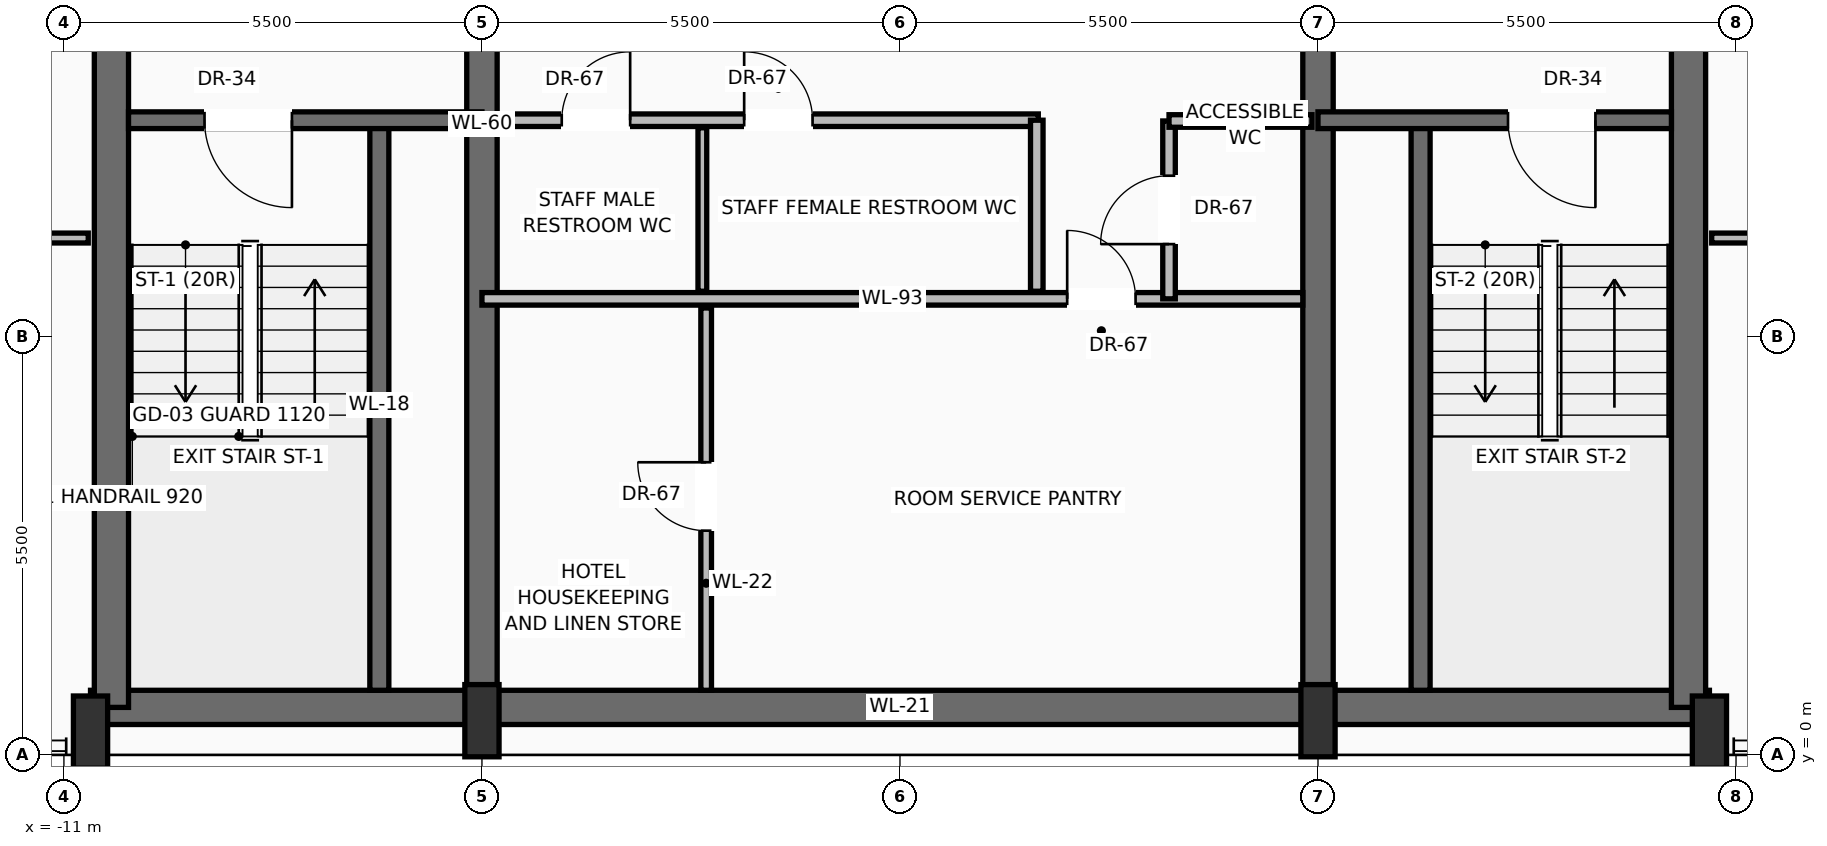
"""IFC4 building model, lengths in metres.
Left out: names, types, materials, properties, quantities, classifications, styles, units other than length and angle.
Written with IfcOpenShell. Run it as: python <this file> out.ifc"""

import sys

from ifc_helpers import new_model, si_unit, direction, frame, frame_2d, origin, origin_2d, place, context, subcontext, project, spatial, rectangle, extrude, source, transform, mapped, element, fill, save


model = new_model("IFC4")
c1 = context("Model", 3, precision=1e-05, world=origin(), true_north=direction((0.0, 1.0)))
c2 = subcontext(c1, "Body", "Model", "MODEL_VIEW")
j1 = project(units=[si_unit("LENGTHUNIT", "METRE"), si_unit("PLANEANGLEUNIT", "RADIAN")], contexts=[c1])
p1 = place(None, origin())
s1 = spatial("IfcSite", under=j1, at=p1, CompositionType="ELEMENT")
p2 = place(p1, origin())
s2 = spatial("IfcBuilding", under=s1, at=p2, CompositionType="ELEMENT")
p3 = place(p2, frame((0.0, 0.0, 290.25)))
s3 = spatial("IfcBuildingStorey", under=s2, at=p3, CompositionType="ELEMENT", Elevation=290.25)
p4 = place(p3, frame((-10.65, 0.625, 0.0), z_axis=(0.0, 0.0, 1.0), x_axis=(1.0, 0.0, 0.0)))
e1 = element("IfcWall", 1, at=p4, inside=s3, PredefinedType="SHEAR", context=c2, shape_type="SweptSolid", body=[
    extrude(rectangle(XDim=21.3, YDim=0.45, at=frame_2d((10.65, 0.0))), origin(), (0.0, 0.0, 1.0), 3.24),
])
for number, where, z_axis, x_axis in (
    (2, (-10.375, 0.625, 0.0), (0.0, 0.0, 1.0), (0.0, 1.0, 0.0)),
    (3, (10.375, 0.625, 0.0), (0.0, 0.0, 1.0), (0.0, 1.0, 0.0)),
):
    element("IfcWall", number, at=place(p3, frame(where, z_axis=z_axis, x_axis=x_axis)), inside=s3, PredefinedType="SHEAR", context=c2, shape_type="SweptSolid", body=[
        extrude(rectangle(XDim=15.35, YDim=0.45, at=frame_2d((7.675, 0.0))), origin(), (0.0, 0.0, 1.0), 3.24),
    ])
p5 = place(p3, frame((-5.5, 0.625, 0.0), z_axis=(0.0, 0.0, 1.0), x_axis=(0.0, 1.0, 0.0)))
e4 = element("IfcWall", 4, at=p5, inside=s3, PredefinedType="SHEAR", context=c2, shape_type="SweptSolid", body=[
    extrude(rectangle(XDim=15.35, YDim=0.4, at=frame_2d((7.675, 0.0))), origin(), (0.0, 0.0, 1.0), 3.24),
])
p6 = place(p5, frame((8.875, 0.0, 0.0)))
e5 = element("IfcOpeningElement", 5, at=p6, cuts=e4, PredefinedType="OPENING", context=c2, shape_type="SweptSolid", body=[
    extrude(rectangle(XDim=1.1, YDim=2.2, at=frame_2d((0.55, 1.1))), frame((0.0, 0.21, 0.0), z_axis=(0.0, -1.0, 0.0), x_axis=(1.0, 0.0, 0.0)), (0.0, 0.0, 1.0), 0.42),
])
p7 = place(p3, frame((5.5, 0.625, 0.0), z_axis=(0.0, 0.0, 1.0), x_axis=(0.0, 1.0, 0.0)))
e6 = element("IfcWall", 6, at=p7, inside=s3, PredefinedType="SHEAR", context=c2, shape_type="SweptSolid", body=[
    extrude(rectangle(XDim=15.35, YDim=0.4, at=frame_2d((7.675, 0.0))), origin(), (0.0, 0.0, 1.0), 3.24),
])
p8 = place(p7, frame((8.875, 0.0, 0.0)))
e7 = element("IfcOpeningElement", 7, at=p8, cuts=e6, PredefinedType="OPENING", context=c2, shape_type="SweptSolid", body=[
    extrude(rectangle(XDim=1.1, YDim=2.2, at=frame_2d((0.55, 1.1))), frame((0.0, 0.21, 0.0), z_axis=(0.0, -1.0, 0.0), x_axis=(1.0, 0.0, 0.0)), (0.0, 0.0, 1.0), 0.42),
])
m1 = source(origin(), c2, "Body", "SweptSolid", [
    extrude(rectangle(XDim=0.45, YDim=0.95, at=origin_2d()), origin(), (0.0, 0.0, 1.0), 3.45),
])
for number, where, z_axis, x_axis in (
    (8, (-10.65, 0.3, 0.0), (0.0, 0.0, 1.0), (1.0, 0.0, 0.0)),
    (9, (-5.5, 0.45, 0.0), (0.0, 0.0, 1.0), (1.0, 0.0, 0.0)),
    (10, (5.5, 0.45, 0.0), (0.0, 0.0, 1.0), (1.0, 0.0, 0.0)),
    (11, (10.65, 0.3, 0.0), (0.0, 0.0, 1.0), (1.0, 0.0, 0.0)),
):
    element("IfcColumn", number, at=place(p3, frame(where, z_axis=z_axis, x_axis=x_axis)), inside=s3, PredefinedType="PILASTER", context=c2, shape_type="MappedRepresentation", body=[
        mapped(m1, transform((0.0, 0.0, 0.0), scale=1.0)),
    ])
p9 = place(p3, frame((-6.85, 0.85, 0.0), z_axis=(0.0, 0.0, 1.0), x_axis=(0.0, 1.0, 0.0)))
e12 = element("IfcWall", 12, at=p9, inside=s3, PredefinedType="SOLIDWALL", context=c2, shape_type="SweptSolid", body=[
    extrude(rectangle(XDim=7.5, YDim=0.25, at=frame_2d((3.75, 0.0))), origin(), (0.0, 0.0, 1.0), 3.24),
])
p10 = place(p3, frame((-5.5, 8.35, 0.0), z_axis=(0.0, 0.0, 1.0), x_axis=(-1.0, 0.0, 0.0)))
e13 = element("IfcWall", 13, at=p10, inside=s3, PredefinedType="SOLIDWALL", context=c2, shape_type="SweptSolid", body=[
    extrude(rectangle(XDim=4.65, YDim=0.22, at=frame_2d((2.325, 0.0))), origin(), (0.0, 0.0, 1.0), 3.24),
])
p11 = place(p10, frame((2.5, 0.0, 0.0)))
e14 = element("IfcOpeningElement", 14, at=p11, cuts=e13, PredefinedType="OPENING", context=c2, shape_type="SweptSolid", body=[
    extrude(rectangle(XDim=1.15, YDim=2.2, at=frame_2d((0.575, 1.1))), frame((0.0, 0.12, 0.0), z_axis=(0.0, -1.0, 0.0), x_axis=(1.0, 0.0, 0.0)), (0.0, 0.0, 1.0), 0.24),
])
p12 = place(p3, frame((6.85, 0.85, 0.0), z_axis=(0.0, 0.0, 1.0), x_axis=(0.0, 1.0, 0.0)))
e15 = element("IfcWall", 15, at=p12, inside=s3, PredefinedType="SOLIDWALL", context=c2, shape_type="SweptSolid", body=[
    extrude(rectangle(XDim=7.5, YDim=0.25, at=frame_2d((3.75, 0.0))), origin(), (0.0, 0.0, 1.0), 3.24),
])
p13 = place(p3, frame((10.15, 8.35, 0.0), z_axis=(0.0, 0.0, 1.0), x_axis=(-1.0, 0.0, 0.0)))
e16 = element("IfcWall", 16, at=p13, inside=s3, PredefinedType="SOLIDWALL", context=c2, shape_type="SweptSolid", body=[
    extrude(rectangle(XDim=4.65, YDim=0.22, at=frame_2d((2.325, 0.0))), origin(), (0.0, 0.0, 1.0), 3.24),
])
p14 = place(p13, frame((1.0, 0.0, 0.0)))
e17 = element("IfcOpeningElement", 17, at=p14, cuts=e16, PredefinedType="OPENING", context=c2, shape_type="SweptSolid", body=[
    extrude(rectangle(XDim=1.15, YDim=2.2, at=frame_2d((0.575, 1.1))), frame((0.0, 0.12, 0.0), z_axis=(0.0, -1.0, 0.0), x_axis=(1.0, 0.0, 0.0)), (0.0, 0.0, 1.0), 0.24),
])
p15 = place(p3, frame((-5.5, 6.0, 0.0), z_axis=(0.0, 0.0, 1.0), x_axis=(1.0, 0.0, 0.0)))
e18 = element("IfcWall", 18, at=p15, inside=s3, PredefinedType="PARTITIONING", context=c2, shape_type="SweptSolid", body=[
    extrude(rectangle(XDim=10.8, YDim=0.165, at=frame_2d((5.4, 0.0))), origin(), (0.0, 0.0, 1.0), 3.232),
])
p16 = place(p15, frame((7.7, 0.0, 0.0)))
e19 = element("IfcOpeningElement", 19, at=p16, cuts=e18, PredefinedType="OPENING", context=c2, shape_type="SweptSolid", body=[
    extrude(rectangle(XDim=0.9, YDim=2.1, at=frame_2d((0.45, 1.05))), frame((0.0, 0.093, 0.0), z_axis=(0.0, -1.0, 0.0), x_axis=(1.0, 0.0, 0.0)), (0.0, 0.0, 1.0), 0.185),
])
p17 = place(p3, frame((-2.55, 0.85, 0.0), z_axis=(0.0, 0.0, 1.0), x_axis=(0.0, 1.0, 0.0)))
e20 = element("IfcWall", 20, at=p17, inside=s3, PredefinedType="PARTITIONING", context=c2, shape_type="SweptSolid", body=[
    extrude(rectangle(XDim=5.03, YDim=0.14, at=frame_2d((2.515, 0.0))), origin(), (0.0, 0.0, 1.0), 3.232),
])
p18 = place(p17, frame((2.1, 0.0, 0.0)))
e21 = element("IfcOpeningElement", 21, at=p18, cuts=e20, PredefinedType="OPENING", context=c2, shape_type="SweptSolid", body=[
    extrude(rectangle(XDim=0.9, YDim=2.1, at=frame_2d((0.45, 1.05))), frame((0.0, 0.08, 0.0), z_axis=(0.0, -1.0, 0.0), x_axis=(1.0, 0.0, 0.0)), (0.0, 0.0, 1.0), 0.16),
])
p19 = place(p3, frame((3.54, 6.0, 0.0), z_axis=(0.0, 0.0, 1.0), x_axis=(0.0, 1.0, 0.0)))
e22 = element("IfcWall", 22, at=p19, inside=s3, PredefinedType="PARTITIONING", context=c2, shape_type="SweptSolid", body=[
    extrude(rectangle(XDim=2.34, YDim=0.165, at=frame_2d((1.17, 0.0))), origin(), (0.0, 0.0, 1.0), 3.232),
])
p20 = place(p19, frame((0.72, 0.0, 0.0)))
e23 = element("IfcOpeningElement", 23, at=p20, cuts=e22, PredefinedType="OPENING", context=c2, shape_type="SweptSolid", body=[
    extrude(rectangle(XDim=0.9, YDim=2.1, at=frame_2d((0.45, 1.05))), frame((0.0, 0.093, 0.0), z_axis=(0.0, -1.0, 0.0), x_axis=(1.0, 0.0, 0.0)), (0.0, 0.0, 1.0), 0.185),
])
p21 = place(p3, frame((3.54, 8.34, 0.0), z_axis=(0.0, 0.0, 1.0), x_axis=(1.0, 0.0, 0.0)))
e24 = element("IfcWall", 24, at=p21, inside=s3, PredefinedType="PARTITIONING", context=c2, shape_type="SweptSolid", body=[
    extrude(rectangle(XDim=1.88, YDim=0.165, at=frame_2d((0.94, 0.0))), origin(), (0.0, 0.0, 1.0), 3.232),
])
p22 = place(p3, frame((-5.3, 8.35, 0.0), z_axis=(0.0, 0.0, 1.0), x_axis=(1.0, 0.0, 0.0)))
e25 = element("IfcWall", 25, at=p22, inside=s3, PredefinedType="PARTITIONING", context=c2, shape_type="SweptSolid", body=[
    extrude(rectangle(XDim=7.12, YDim=0.165, at=frame_2d((3.56, 0.0))), origin(), (0.0, 0.0, 1.0), 3.232),
])
p23 = place(p22, frame((0.85, 0.0, 0.0)))
e26 = element("IfcOpeningElement", 26, at=p23, cuts=e25, PredefinedType="OPENING", context=c2, shape_type="SweptSolid", body=[
    extrude(rectangle(XDim=0.9, YDim=2.1, at=frame_2d((0.45, 1.05))), frame((0.0, 0.093, 0.0), z_axis=(0.0, -1.0, 0.0), x_axis=(1.0, 0.0, 0.0)), (0.0, 0.0, 1.0), 0.185),
])
p24 = place(p22, frame((3.25, 0.0, 0.0)))
e27 = element("IfcOpeningElement", 27, at=p24, cuts=e25, PredefinedType="OPENING", context=c2, shape_type="SweptSolid", body=[
    extrude(rectangle(XDim=0.9, YDim=2.1, at=frame_2d((0.45, 1.05))), frame((0.0, 0.093, 0.0), z_axis=(0.0, -1.0, 0.0), x_axis=(1.0, 0.0, 0.0)), (0.0, 0.0, 1.0), 0.185),
])
p25 = place(p3, frame((1.8, 6.1, 0.0), z_axis=(0.0, 0.0, 1.0), x_axis=(0.0, 1.0, 0.0)))
e28 = element("IfcWall", 28, at=p25, inside=s3, PredefinedType="PARTITIONING", context=c2, shape_type="SweptSolid", body=[
    extrude(rectangle(XDim=2.25, YDim=0.165, at=frame_2d((1.125, 0.0))), origin(), (0.0, 0.0, 1.0), 3.232),
])
p26 = place(p3, frame((-2.6, 6.1, 0.0), z_axis=(0.0, 0.0, 1.0), x_axis=(0.0, 1.0, 0.0)))
e29 = element("IfcWall", 29, at=p26, inside=s3, PredefinedType="PARTITIONING", context=c2, shape_type="SweptSolid", body=[
    extrude(rectangle(XDim=2.15, YDim=0.115, at=frame_2d((1.075, 0.0))), origin(), (0.0, 0.0, 1.0), 3.232),
])
p27 = place(p3, frame((-22.288, 6.8, 0.0), z_axis=(0.0, 0.0, 1.0), x_axis=(1.0, 0.0, 0.0)))
e30 = element("IfcWall", 30, at=p27, inside=s3, PredefinedType="PARTITIONING", context=c2, shape_type="SweptSolid", body=[
    extrude(rectangle(XDim=11.608, YDim=0.13, at=frame_2d((5.804, 0.0))), origin(), (0.0, 0.0, 1.0), 3.232),
])
p28 = place(p27, frame((4.783, 0.0, 0.0)))
e31 = element("IfcOpeningElement", 31, at=p28, cuts=e30, PredefinedType="OPENING", context=c2, shape_type="SweptSolid", body=[
    extrude(rectangle(XDim=0.95, YDim=2.2, at=frame_2d((0.475, 1.1))), frame((0.0, 0.075, 0.0), z_axis=(0.0, -1.0, 0.0), x_axis=(1.0, 0.0, 0.0)), (0.0, 0.0, 1.0), 0.15),
])
p29 = place(p3, frame((10.68, 6.8, 0.0), z_axis=(0.0, 0.0, 1.0), x_axis=(1.0, 0.0, 0.0)))
e32 = element("IfcWall", 32, at=p29, inside=s3, PredefinedType="PARTITIONING", context=c2, shape_type="SweptSolid", body=[
    extrude(rectangle(XDim=11.562, YDim=0.13, at=frame_2d((5.781, 0.0))), origin(), (0.0, 0.0, 1.0), 3.232),
])
p30 = place(p29, frame((4.762, 0.0, 0.0)))
e33 = element("IfcOpeningElement", 33, at=p30, cuts=e32, PredefinedType="OPENING", context=c2, shape_type="SweptSolid", body=[
    extrude(rectangle(XDim=0.95, YDim=2.2, at=frame_2d((0.475, 1.1))), frame((0.0, 0.075, 0.0), z_axis=(0.0, -1.0, 0.0), x_axis=(1.0, 0.0, 0.0)), (0.0, 0.0, 1.0), 0.15),
])
m2 = source(origin(), c2, "Body", "SweptSolid", [
    extrude(rectangle(XDim=1.15, YDim=2.2, at=frame_2d((0.575, 1.1))), frame((0.0, 0.025, 0.0), z_axis=(0.0, -1.0, 0.0), x_axis=(1.0, 0.0, 0.0)), (0.0, 0.0, 1.0), 0.05),
])
p31 = place(p11, origin())
e34 = element("IfcDoor", 34, at=p31, inside=s3, OperationType="SINGLE_SWING_LEFT", PredefinedType="DOOR", context=c2, shape_type="MappedRepresentation", body=[
    mapped(m2, transform((0.0, 0.0, 0.0), scale=1.0)),
])
fill(e14, e34)
p32 = place(p14, origin())
e35 = element("IfcDoor", 35, at=p32, inside=s3, OperationType="SINGLE_SWING_LEFT", PredefinedType="DOOR", context=c2, shape_type="MappedRepresentation", body=[
    mapped(m2, transform((0.0, 0.0, 0.0), scale=1.0)),
])
fill(e17, e35)
m3 = source(origin(), c2, "Body", "SweptSolid", [
    extrude(rectangle(XDim=0.9, YDim=2.1, at=frame_2d((0.45, 1.05))), frame((0.0, 0.025, 0.0), z_axis=(0.0, -1.0, 0.0), x_axis=(1.0, 0.0, 0.0)), (0.0, 0.0, 1.0), 0.05),
])
p33 = place(p16, origin())
e36 = element("IfcDoor", 36, at=p33, inside=s3, OperationType="SINGLE_SWING_LEFT", PredefinedType="DOOR", context=c2, shape_type="MappedRepresentation", body=[
    mapped(m3, transform((0.0, 0.0, 0.0), scale=1.0)),
])
fill(e19, e36)
p34 = place(p18, origin())
e37 = element("IfcDoor", 37, at=p34, inside=s3, OperationType="SINGLE_SWING_RIGHT", PredefinedType="DOOR", context=c2, shape_type="MappedRepresentation", body=[
    mapped(m3, transform((0.0, 0.0, 0.0), scale=1.0)),
])
fill(e21, e37)
p35 = place(p20, origin())
e38 = element("IfcDoor", 38, at=p35, inside=s3, OperationType="SINGLE_SWING_LEFT", PredefinedType="DOOR", context=c2, shape_type="MappedRepresentation", body=[
    mapped(m3, transform((0.0, 0.0, 0.0), scale=1.0)),
])
fill(e23, e38)
p36 = place(p23, origin())
e39 = element("IfcDoor", 39, at=p36, inside=s3, OperationType="SINGLE_SWING_RIGHT", PredefinedType="DOOR", context=c2, shape_type="MappedRepresentation", body=[
    mapped(m3, transform((0.0, 0.0, 0.0), scale=1.0)),
])
fill(e26, e39)
p37 = place(p24, origin())
e40 = element("IfcDoor", 40, at=p37, inside=s3, OperationType="SINGLE_SWING_LEFT", PredefinedType="DOOR", context=c2, shape_type="MappedRepresentation", body=[
    mapped(m3, transform((0.0, 0.0, 0.0), scale=1.0)),
])
fill(e27, e40)
save(model, sys.argv[1])
